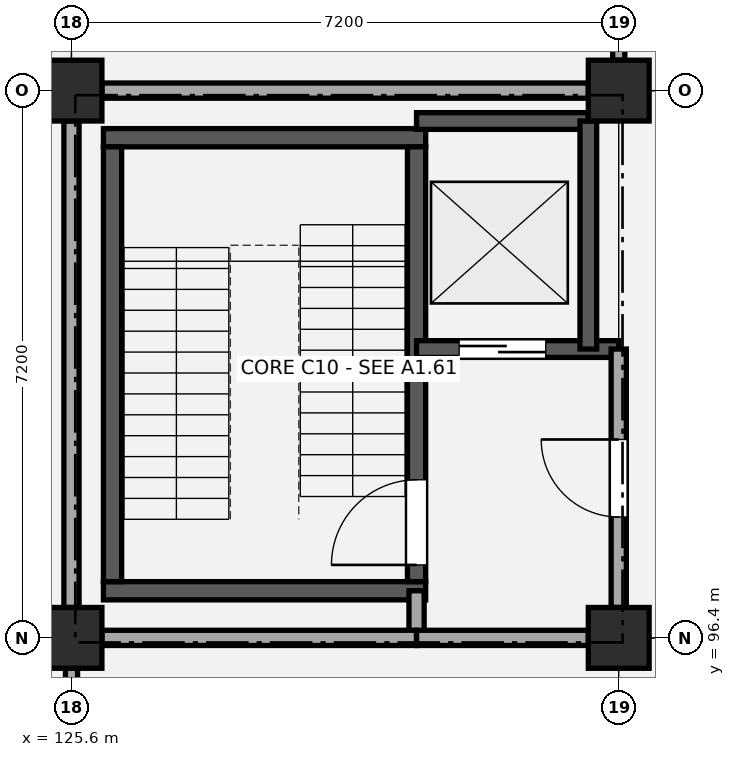
"""IFC4 building model, lengths in metres.
Left out: names, types, materials, properties, quantities, classifications, styles, units other than length and angle.
Written with IfcOpenShell. Run it as: python <this file> out.ifc"""

import sys

from ifc_helpers import new_model, si_unit, direction, frame, frame_2d, origin, origin_2d, place, context, subcontext, project, spatial, rectangle, extrude, element, fill, save


model = new_model("IFC4")
c1 = context("Model", 3, precision=1e-05, world=origin(), true_north=direction((0.0, 1.0)))
c2 = subcontext(c1, "Body", "Model", "MODEL_VIEW")
j1 = project(units=[si_unit("LENGTHUNIT", "METRE"), si_unit("PLANEANGLEUNIT", "RADIAN")], contexts=[c1])
p1 = place(None, origin())
s1 = spatial("IfcSite", under=j1, at=p1, CompositionType="ELEMENT")
p2 = place(p1, origin())
s2 = spatial("IfcBuilding", under=s1, at=p2, CompositionType="ELEMENT")
p3 = place(p2, origin())
s3 = spatial("IfcBuildingStorey", under=s2, at=p3, CompositionType="ELEMENT", Elevation=0.0)
for number, where, z_axis, x_axis in (
    (1, (125.6, 96.4, -0.35), (0.0, 0.0, 1.0), (1.0, 0.0, 0.0)),
    (2, (125.6, 103.6, -0.35), (0.0, 0.0, 1.0), (1.0, 0.0, 0.0)),
    (3, (132.8, 96.4, -0.35), (0.0, 0.0, 1.0), (1.0, 0.0, 0.0)),
    (4, (132.8, 103.6, -0.35), (0.0, 0.0, 1.0), (1.0, 0.0, 0.0)),
):
    element("IfcColumn", number, at=place(p3, frame(where, z_axis=z_axis, x_axis=x_axis)), inside=s3, PredefinedType="COLUMN", context=c2, shape_type="SweptSolid", body=[
        extrude(rectangle(XDim=0.8, YDim=0.8, at=origin_2d()), origin(), (0.0, 0.0, 1.0), 5.03),
    ])
for number, where, z_axis, x_axis in (
    (5, (126.02, 97.02, 0.0), (0.0, 0.0, 1.0), (1.0, 0.0, 0.0)),
    (6, (126.02, 102.98, 0.0), (0.0, 0.0, 1.0), (1.0, 0.0, 0.0)),
):
    element("IfcWall", number, at=place(p3, frame(where, z_axis=z_axis, x_axis=x_axis)), inside=s3, PredefinedType="SHEAR", context=c2, shape_type="SweptSolid", body=[
        extrude(rectangle(XDim=4.24, YDim=0.24, at=frame_2d((2.12, 0.0))), origin(), (0.0, 0.0, 1.0), 4.38),
    ])
p4 = place(p3, frame((126.14, 97.14, 0.0), z_axis=(0.0, 0.0, 1.0), x_axis=(0.0, 1.0, 0.0)))
e7 = element("IfcWall", 7, at=p4, inside=s3, PredefinedType="SHEAR", context=c2, shape_type="SweptSolid", body=[
    extrude(rectangle(XDim=5.72, YDim=0.24, at=frame_2d((2.86, 0.0))), origin(), (0.0, 0.0, 1.0), 4.38),
])
p5 = place(p3, frame((130.14, 97.14, 0.0), z_axis=(0.0, 0.0, 1.0), x_axis=(0.0, 1.0, 0.0)))
e8 = element("IfcWall", 8, at=p5, inside=s3, PredefinedType="SHEAR", context=c2, shape_type="SweptSolid", body=[
    extrude(rectangle(XDim=5.72, YDim=0.24, at=frame_2d((2.86, 0.0))), origin(), (0.0, 0.0, 1.0), 4.38),
])
p6 = place(p5, frame((0.22, 0.0, 0.0)))
e9 = element("IfcOpeningElement", 9, at=p6, cuts=e8, PredefinedType="OPENING", context=c2, shape_type="SweptSolid", body=[
    extrude(rectangle(XDim=1.12, YDim=2.15, at=frame_2d((0.56, 1.075))), frame((0.0, 0.13, 0.0), z_axis=(0.0, -1.0, 0.0), x_axis=(1.0, 0.0, 0.0)), (0.0, 0.0, 1.0), 0.26),
])
p7 = place(p3, frame((130.14, 100.2, 0.0), z_axis=(0.0, 0.0, 1.0), x_axis=(1.0, 0.0, 0.0)))
e10 = element("IfcWall", 10, at=p7, inside=s3, PredefinedType="SHEAR", context=c2, shape_type="SweptSolid", body=[
    extrude(rectangle(XDim=2.66, YDim=0.22, at=frame_2d((1.33, 0.0))), origin(), (0.0, 0.0, 1.0), 4.38),
])
p8 = place(p7, frame((0.56, 0.0, 0.0)))
e11 = element("IfcOpeningElement", 11, at=p8, cuts=e10, PredefinedType="OPENING", context=c2, shape_type="SweptSolid", body=[
    extrude(rectangle(XDim=1.14, YDim=2.15, at=frame_2d((0.57, 1.075))), frame((0.0, 0.12, 0.0), z_axis=(0.0, -1.0, 0.0), x_axis=(1.0, 0.0, 0.0)), (0.0, 0.0, 1.0), 0.24),
])
p9 = place(p3, frame((130.14, 103.2, 0.0), z_axis=(0.0, 0.0, 1.0), x_axis=(1.0, 0.0, 0.0)))
e12 = element("IfcWall", 12, at=p9, inside=s3, PredefinedType="SHEAR", context=c2, shape_type="SweptSolid", body=[
    extrude(rectangle(XDim=2.26, YDim=0.22, at=frame_2d((1.13, 0.0))), origin(), (0.0, 0.0, 1.0), 4.38),
])
p10 = place(p3, frame((132.4, 100.2, 0.0), z_axis=(0.0, 0.0, 1.0), x_axis=(0.0, 1.0, 0.0)))
e13 = element("IfcWall", 13, at=p10, inside=s3, PredefinedType="SHEAR", context=c2, shape_type="SweptSolid", body=[
    extrude(rectangle(XDim=3.0, YDim=0.22, at=frame_2d((1.5, 0.0))), origin(), (0.0, 0.0, 1.0), 4.38),
])
p11 = place(p3, frame((130.14, 96.4, 0.0), z_axis=(0.0, 0.0, 1.0), x_axis=(0.0, 1.0, 0.0)))
e14 = element("IfcWall", 14, at=p11, inside=s3, PredefinedType="PARTITIONING", context=c2, shape_type="SweptSolid", body=[
    extrude(rectangle(XDim=0.62, YDim=0.2, at=frame_2d((0.31, 0.0))), origin(), (0.0, 0.0, 1.0), 3.52),
])
p12 = place(p3, frame((125.6, 96.8, 0.0), z_axis=(0.0, 0.0, 1.0), x_axis=(0.0, 1.0, 0.0)))
e15 = element("IfcWall", 15, at=p12, inside=s3, PredefinedType="PARTITIONING", context=c2, shape_type="SweptSolid", body=[
    extrude(rectangle(XDim=6.4, YDim=0.2, at=frame_2d((3.2, 0.0))), origin(), (0.0, 0.0, 1.0), 3.62),
])
p13 = place(p3, frame((132.8, 96.8, 0.0), z_axis=(0.0, 0.0, 1.0), x_axis=(0.0, 1.0, 0.0)))
e16 = element("IfcWall", 16, at=p13, inside=s3, PredefinedType="PARTITIONING", context=c2, shape_type="SweptSolid", body=[
    extrude(rectangle(XDim=3.4, YDim=0.2, at=frame_2d((1.7, 0.0))), origin(), (0.0, 0.0, 1.0), 3.62),
])
p14 = place(p13, frame((1.19, 0.0, 0.0)))
e17 = element("IfcOpeningElement", 17, at=p14, cuts=e16, PredefinedType="OPENING", context=c2, shape_type="SweptSolid", body=[
    extrude(rectangle(XDim=1.02, YDim=2.15, at=frame_2d((0.51, 1.075))), frame((0.0, 0.11, 0.0), z_axis=(0.0, -1.0, 0.0), x_axis=(1.0, 0.0, 0.0)), (0.0, 0.0, 1.0), 0.22),
])
p15 = place(p3, frame((126.0, 96.4, 0.0), z_axis=(0.0, 0.0, 1.0), x_axis=(1.0, 0.0, 0.0)))
e18 = element("IfcWall", 18, at=p15, inside=s3, PredefinedType="PARTITIONING", context=c2, shape_type="SweptSolid", body=[
    extrude(rectangle(XDim=4.14, YDim=0.2, at=frame_2d((2.07, 0.0))), origin(), (0.0, 0.0, 1.0), 3.52),
])
p16 = place(p3, frame((130.14, 96.4, 0.0), z_axis=(0.0, 0.0, 1.0), x_axis=(1.0, 0.0, 0.0)))
e19 = element("IfcWall", 19, at=p16, inside=s3, PredefinedType="PARTITIONING", context=c2, shape_type="SweptSolid", body=[
    extrude(rectangle(XDim=2.26, YDim=0.2, at=frame_2d((1.13, 0.0))), origin(), (0.0, 0.0, 1.0), 3.52),
])
p17 = place(p3, frame((126.0, 103.6, 0.0), z_axis=(0.0, 0.0, 1.0), x_axis=(1.0, 0.0, 0.0)))
e20 = element("IfcWall", 20, at=p17, inside=s3, PredefinedType="PARTITIONING", context=c2, shape_type="SweptSolid", body=[
    extrude(rectangle(XDim=6.4, YDim=0.2, at=frame_2d((3.2, 0.0))), origin(), (0.0, 0.0, 1.0), 3.62),
])
p18 = place(p3, frame((125.6, 89.6, 0.0), z_axis=(0.0, 0.0, 1.0), x_axis=(0.0, 1.0, 0.0)))
e21 = element("IfcWall", 21, at=p18, inside=s3, PredefinedType="PARTITIONING", context=c2, shape_type="SweptSolid", body=[
    extrude(rectangle(XDim=6.4, YDim=0.16, at=frame_2d((3.2, 0.0))), origin(), (0.0, 0.0, 1.0), 3.62),
])
p19 = place(p3, frame((132.8, 104.0, 0.0), z_axis=(0.0, 0.0, 1.0), x_axis=(0.0, 1.0, 0.0)))
e22 = element("IfcWall", 22, at=p19, inside=s3, PredefinedType="PARTITIONING", context=c2, shape_type="SweptSolid", body=[
    extrude(rectangle(XDim=4.0, YDim=0.16, at=frame_2d((2.0, 0.0))), origin(), (0.0, 0.0, 1.0), 3.62),
])
p20 = place(p19, frame((1.17, 0.0, 0.0)))
e23 = element("IfcOpeningElement", 23, at=p20, cuts=e22, PredefinedType="OPENING", context=c2, shape_type="SweptSolid", body=[
    extrude(rectangle(XDim=1.66, YDim=2.22, at=frame_2d((0.83, 1.11))), frame((0.0, 0.09, 0.0), z_axis=(0.0, -1.0, 0.0), x_axis=(1.0, 0.0, 0.0)), (0.0, 0.0, 1.0), 0.18),
])
p21 = place(p6, origin())
e24 = element("IfcDoor", 24, at=p21, inside=s3, OperationType="SINGLE_SWING_LEFT", PredefinedType="DOOR", context=c2, shape_type="SweptSolid", body=[
    extrude(rectangle(XDim=1.12, YDim=2.15, at=frame_2d((0.56, 1.075))), frame((0.0, 0.025, 0.0), z_axis=(0.0, -1.0, 0.0), x_axis=(1.0, 0.0, 0.0)), (0.0, 0.0, 1.0), 0.05),
])
fill(e9, e24)
p22 = place(p8, origin())
e25 = element("IfcDoor", 25, at=p22, inside=s3, OperationType="SLIDING_TO_LEFT", PredefinedType="DOOR", context=c2, shape_type="SweptSolid", body=[
    extrude(rectangle(XDim=1.14, YDim=2.15, at=frame_2d((0.57, 1.075))), frame((0.0, 0.025, 0.0), z_axis=(0.0, -1.0, 0.0), x_axis=(1.0, 0.0, 0.0)), (0.0, 0.0, 1.0), 0.05),
])
fill(e11, e25)
p23 = place(p14, origin())
e26 = element("IfcDoor", 26, at=p23, inside=s3, OperationType="SINGLE_SWING_RIGHT", PredefinedType="DOOR", context=c2, shape_type="SweptSolid", body=[
    extrude(rectangle(XDim=1.02, YDim=2.15, at=frame_2d((0.51, 1.075))), frame((0.0, 0.025, 0.0), z_axis=(0.0, -1.0, 0.0), x_axis=(1.0, 0.0, 0.0)), (0.0, 0.0, 1.0), 0.05),
])
fill(e17, e26)
save(model, sys.argv[1])
